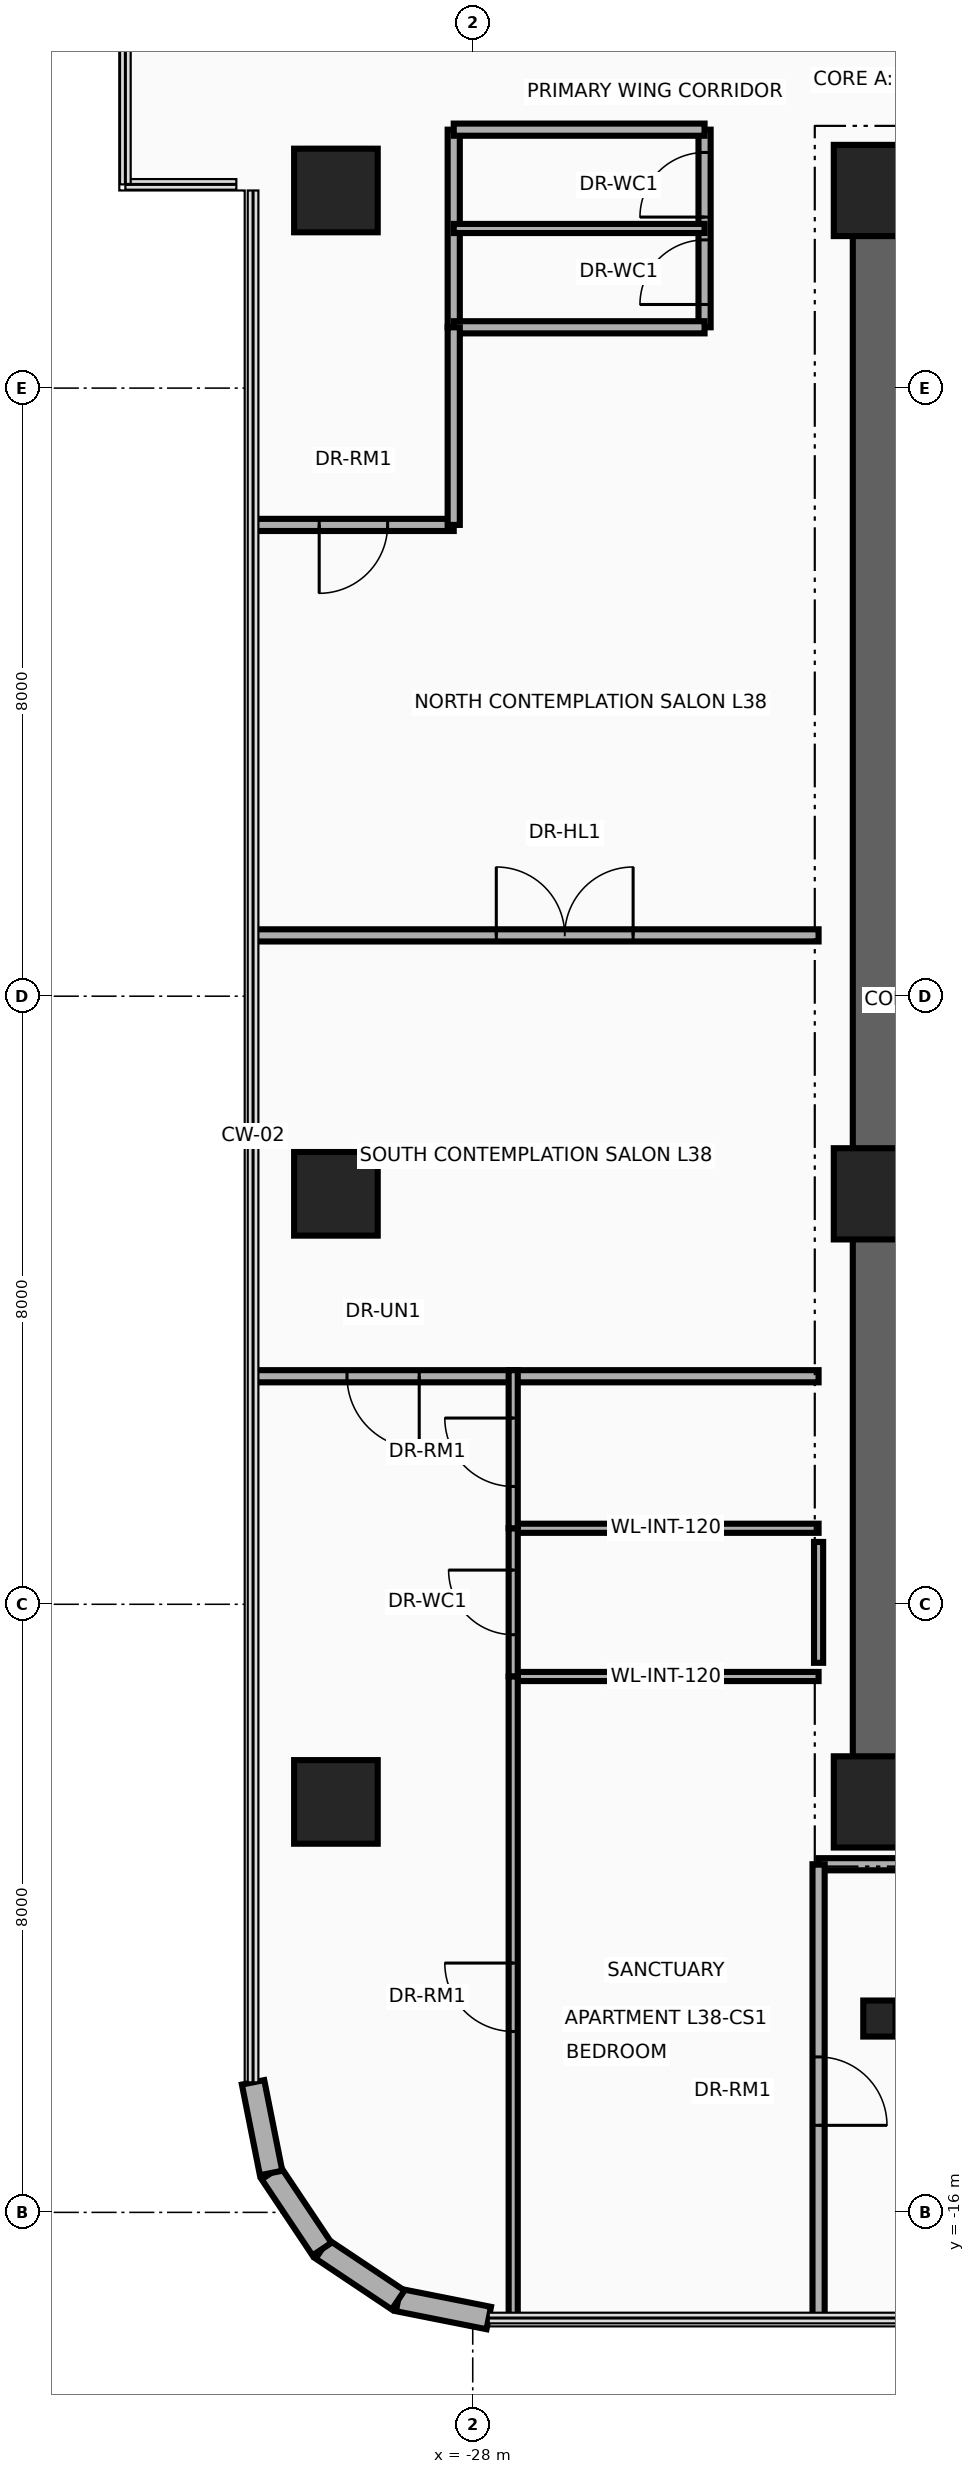
"""IFC4 building model, lengths in metres.
Left out: names, types, materials, properties, quantities, classifications, styles, units other than length and angle.
Written with IfcOpenShell. Run it as: python <this file> out.ifc"""

import sys

from ifc_helpers import new_model, si_unit, direction, frame, frame_2d, origin, origin_2d, place, context, subcontext, project, spatial, rectangle, circle, i_section, extrude, source, transform, mapped, element, fill, save


model = new_model("IFC4")
c1 = context("Model", 3, precision=1e-05, world=origin(), true_north=direction((0.0, 1.0)))
c2 = subcontext(c1, "Body", "Model", "MODEL_VIEW")
j1 = project(units=[si_unit("LENGTHUNIT", "METRE"), si_unit("PLANEANGLEUNIT", "RADIAN")], contexts=[c1])
p1 = place(None, origin())
s1 = spatial("IfcSite", under=j1, at=p1, CompositionType="ELEMENT")
p2 = place(p1, origin())
s2 = spatial("IfcBuilding", under=s1, at=p2, CompositionType="ELEMENT")
p3 = place(p2, frame((0.0, 0.0, 150.1)))
s3 = spatial("IfcBuildingStorey", under=s2, at=p3, CompositionType="ELEMENT", Elevation=150.1)
p4 = place(p3, frame((-22.65, -11.15, 0.0), z_axis=(0.0, 0.0, 1.0), x_axis=(0.0, 1.0, 0.0)))
e1 = element("IfcWall", 1, at=p4, inside=s3, PredefinedType="SHEAR", context=c2, shape_type="SweptSolid", body=[
    extrude(rectangle(XDim=22.3, YDim=0.7, at=frame_2d((11.15, 0.0))), origin(), (0.0, 0.0, 1.0), 3.46),
])
for number, where, z_axis, x_axis in (
    (2, (-22.65, 10.8, 0.0), (0.0, 0.0, 1.0), (1.0, 0.0, 0.0)),
    (3, (-22.65, -10.8, 0.0), (0.0, 0.0, 1.0), (1.0, 0.0, 0.0)),
):
    element("IfcWall", number, at=place(p3, frame(where, z_axis=z_axis, x_axis=x_axis)), inside=s3, PredefinedType="SHEAR", context=c2, shape_type="SweptSolid", body=[
        extrude(rectangle(XDim=10.25, YDim=0.7, at=frame_2d((5.125, 0.0))), origin(), (0.0, 0.0, 1.0), 3.46),
    ])
m1 = source(origin(), c2, "Body", "SweptSolid", [
    extrude(circle(Radius=0.55, at=origin_2d()), origin(), (0.0, 0.0, 1.0), 3.7),
])
p5 = place(p3, frame((-29.8, -10.6, 0.0), z_axis=(0.0, 0.0, 1.0), x_axis=(1.0, 0.0, 0.0)))
e4 = element("IfcColumn", 4, at=p5, inside=s3, PredefinedType="COLUMN", context=c2, shape_type="MappedRepresentation", body=[
    mapped(m1, transform((0.0, 0.0, 0.0), x_axis=(1.0, 0.0, 0.0), y_axis=(0.0, 1.0, 0.0), z_axis=(0.0, 0.0, 1.0), scale=1.0)),
])
m2 = source(origin(), c2, "Body", "SweptSolid", [
    extrude(rectangle(XDim=1.2, YDim=1.2, at=origin_2d()), origin(), (0.0, 0.0, 1.0), 3.7),
])
p6 = place(p3, frame((-22.65, -10.6, 0.0), z_axis=(0.0, 0.0, 1.0), x_axis=(1.0, 0.0, 0.0)))
e5 = element("IfcColumn", 5, at=p6, inside=s3, PredefinedType="COLUMN", context=c2, shape_type="MappedRepresentation", body=[
    mapped(m2, transform((0.0, 0.0, 0.0), x_axis=(1.0, 0.0, 0.0), y_axis=(0.0, 1.0, 0.0), z_axis=(0.0, 0.0, 1.0), scale=1.0)),
])
p7 = place(p3, frame((-29.8, -2.6, 0.0), z_axis=(0.0, 0.0, 1.0), x_axis=(1.0, 0.0, 0.0)))
e6 = element("IfcColumn", 6, at=p7, inside=s3, PredefinedType="COLUMN", context=c2, shape_type="MappedRepresentation", body=[
    mapped(m1, transform((0.0, 0.0, 0.0), x_axis=(1.0, 0.0, 0.0), y_axis=(0.0, 1.0, 0.0), z_axis=(0.0, 0.0, 1.0), scale=1.0)),
])
p8 = place(p3, frame((-22.65, -2.6, 0.0), z_axis=(0.0, 0.0, 1.0), x_axis=(1.0, 0.0, 0.0)))
e7 = element("IfcColumn", 7, at=p8, inside=s3, PredefinedType="COLUMN", context=c2, shape_type="MappedRepresentation", body=[
    mapped(m2, transform((0.0, 0.0, 0.0), x_axis=(1.0, 0.0, 0.0), y_axis=(0.0, 1.0, 0.0), z_axis=(0.0, 0.0, 1.0), scale=1.0)),
])
p9 = place(p3, frame((-29.8, 10.6, 0.0), z_axis=(0.0, 0.0, 1.0), x_axis=(1.0, 0.0, 0.0)))
e8 = element("IfcColumn", 8, at=p9, inside=s3, PredefinedType="COLUMN", context=c2, shape_type="MappedRepresentation", body=[
    mapped(m1, transform((0.0, 0.0, 0.0), x_axis=(1.0, 0.0, 0.0), y_axis=(0.0, 1.0, 0.0), z_axis=(0.0, 0.0, 1.0), scale=1.0)),
])
p10 = place(p3, frame((-22.65, 10.6, 0.0), z_axis=(0.0, 0.0, 1.0), x_axis=(1.0, 0.0, 0.0)))
e9 = element("IfcColumn", 9, at=p10, inside=s3, PredefinedType="COLUMN", context=c2, shape_type="MappedRepresentation", body=[
    mapped(m2, transform((0.0, 0.0, 0.0), x_axis=(1.0, 0.0, 0.0), y_axis=(0.0, 1.0, 0.0), z_axis=(0.0, 0.0, 1.0), scale=1.0)),
])
m3 = source(origin(), c2, "Body", "SweptSolid", [
    extrude(i_section(OverallWidth=0.424, OverallDepth=0.474, WebThickness=0.048, FlangeThickness=0.077, at=origin_2d()), origin(), (0.0, 0.0, 1.0), 3.7),
])
p11 = place(p3, frame((-22.65, -13.45, 0.0), z_axis=(0.0, 0.0, 1.0), x_axis=(1.0, 0.0, 0.0)))
e10 = element("IfcColumn", 10, at=p11, inside=s3, PredefinedType="COLUMN", context=c2, shape_type="MappedRepresentation", body=[
    mapped(m3, transform((0.0, 0.0, 0.0), x_axis=(1.0, 0.0, 0.0), y_axis=(0.0, 1.0, 0.0), z_axis=(0.0, 0.0, 1.0), scale=1.0)),
])
p12 = place(p3, frame((-27.789, -17.39, 0.0), z_axis=(0.0, 0.0, 1.0), x_axis=(-0.980804027463, 0.194996050505, 0.0)))
e11 = element("IfcWall", 11, at=p12, inside=s3, PredefinedType="SOLIDWALL", context=c2, shape_type="SweptSolid", body=[
    extrude(rectangle(XDim=1.216, YDim=0.3, at=frame_2d((0.608, 0.0))), origin(), (0.0, 0.0, 1.0), 3.46),
])
for number, where, z_axis, x_axis in (
    (12, (-28.982, -17.153, 0.0), (0.0, 0.0, 1.0), (-0.831, 0.556, 0.0)),
    (13, (-29.983, -16.483, 0.0), (0.0, 0.0, 1.0), (-0.556, 0.831, 0.0)),
):
    element("IfcWall", number, at=place(p3, frame(where, z_axis=z_axis, x_axis=x_axis)), inside=s3, PredefinedType="SOLIDWALL", context=c2, shape_type="SweptSolid", body=[
        extrude(rectangle(XDim=1.205, YDim=0.3, at=frame_2d((0.603, 0.0))), origin(), (0.0, 0.0, 1.0), 3.46),
    ])
p13 = place(p3, frame((-30.653, -15.482, 0.0), z_axis=(0.0, 0.0, 1.0), x_axis=(-0.194996050505, 0.980804027463, 0.0)))
e14 = element("IfcWall", 14, at=p13, inside=s3, PredefinedType="SOLIDWALL", context=c2, shape_type="SweptSolid", body=[
    extrude(rectangle(XDim=1.216, YDim=0.3, at=frame_2d((0.608, 0.0))), origin(), (0.0, 0.0, 1.0), 3.46),
])
p14 = place(p3, frame((-28.25, 8.8, 0.0), z_axis=(0.0, 0.0, 1.0), x_axis=(0.0, 1.0, 0.0)))
e15 = element("IfcWall", 15, at=p14, inside=s3, PredefinedType="PARTITIONING", context=c2, shape_type="SweptSolid", body=[
    extrude(rectangle(XDim=2.6, YDim=0.16, at=frame_2d((1.3, 0.0))), origin(), (0.0, 0.0, 1.0), 2.666),
])
p15 = place(p3, frame((-24.95, 8.8, 0.0), z_axis=(0.0, 0.0, 1.0), x_axis=(0.0, 1.0, 0.0)))
e16 = element("IfcWall", 16, at=p15, inside=s3, PredefinedType="PARTITIONING", context=c2, shape_type="SweptSolid", body=[
    extrude(rectangle(XDim=2.6, YDim=0.16, at=frame_2d((1.3, 0.0))), origin(), (0.0, 0.0, 1.0), 2.666),
])
p16 = place(p15, frame((0.3, 0.0, 0.0)))
e17 = element("IfcOpeningElement", 17, at=p16, cuts=e16, PredefinedType="OPENING", context=c2, shape_type="SweptSolid", body=[
    extrude(rectangle(XDim=0.85, YDim=2.1, at=frame_2d((0.425, 1.05))), frame((0.0, 0.095, 0.0), z_axis=(0.0, -1.0, 0.0), x_axis=(1.0, 0.0, 0.0)), (0.0, 0.0, 1.0), 0.19),
])
p17 = place(p15, frame((1.45, 0.0, 0.0)))
e18 = element("IfcOpeningElement", 18, at=p17, cuts=e16, PredefinedType="OPENING", context=c2, shape_type="SweptSolid", body=[
    extrude(rectangle(XDim=0.85, YDim=2.1, at=frame_2d((0.425, 1.05))), frame((0.0, 0.095, 0.0), z_axis=(0.0, -1.0, 0.0), x_axis=(1.0, 0.0, 0.0)), (0.0, 0.0, 1.0), 0.19),
])
for number, where, z_axis, x_axis in (
    (19, (-28.25, 8.8, 0.0), (0.0, 0.0, 1.0), (1.0, 0.0, 0.0)),
    (20, (-28.25, 11.4, 0.0), (0.0, 0.0, 1.0), (1.0, 0.0, 0.0)),
):
    element("IfcWall", number, at=place(p3, frame(where, z_axis=z_axis, x_axis=x_axis)), inside=s3, PredefinedType="PARTITIONING", context=c2, shape_type="SweptSolid", body=[
        extrude(rectangle(XDim=3.3, YDim=0.16, at=frame_2d((1.65, 0.0))), origin(), (0.0, 0.0, 1.0), 3.46),
    ])
p18 = place(p3, frame((-28.25, 10.1, 0.0), z_axis=(0.0, 0.0, 1.0), x_axis=(1.0, 0.0, 0.0)))
e21 = element("IfcWall", 21, at=p18, inside=s3, PredefinedType="PARTITIONING", context=c2, shape_type="SweptSolid", body=[
    extrude(rectangle(XDim=3.3, YDim=0.12, at=frame_2d((1.65, 0.0))), origin(), (0.0, 0.0, 1.0), 3.46),
])
p19 = place(p3, frame((-23.45, -11.42, 0.0), z_axis=(0.0, 0.0, 1.0), x_axis=(1.0, 0.0, 0.0)))
e22 = element("IfcWall", 22, at=p19, inside=s3, PredefinedType="PARTITIONING", context=c2, shape_type="SweptSolid", body=[
    extrude(rectangle(XDim=13.84, YDim=0.16, at=frame_2d((6.92, 0.0))), origin(), (0.0, 0.0, 1.0), 2.834),
])
p20 = place(p3, frame((-23.45, -17.39, 0.0), z_axis=(0.0, 0.0, 1.0), x_axis=(0.0, 1.0, 0.0)))
e23 = element("IfcWall", 23, at=p20, inside=s3, PredefinedType="PARTITIONING", context=c2, shape_type="SweptSolid", body=[
    extrude(rectangle(XDim=5.97, YDim=0.16, at=frame_2d((2.985, 0.0))), origin(), (0.0, 0.0, 1.0), 3.46),
])
p21 = place(p20, frame((2.535, 0.0, 0.0)))
e24 = element("IfcOpeningElement", 24, at=p21, cuts=e23, PredefinedType="OPENING", context=c2, shape_type="SweptSolid", body=[
    extrude(rectangle(XDim=0.9, YDim=2.1, at=frame_2d((0.45, 1.05))), frame((0.0, 0.095, 0.0), z_axis=(0.0, -1.0, 0.0), x_axis=(1.0, 0.0, 0.0)), (0.0, 0.0, 1.0), 0.19),
])
p22 = place(p3, frame((-30.89, -5.0, 0.0), z_axis=(0.0, 0.0, 1.0), x_axis=(1.0, 0.0, 0.0)))
e25 = element("IfcWall", 25, at=p22, inside=s3, PredefinedType="PARTITIONING", context=c2, shape_type="SweptSolid", body=[
    extrude(rectangle(XDim=7.44, YDim=0.16, at=frame_2d((3.72, 0.0))), origin(), (0.0, 0.0, 1.0), 2.896),
])
p23 = place(p22, frame((1.236, 0.0, 0.0)))
e26 = element("IfcOpeningElement", 26, at=p23, cuts=e25, PredefinedType="OPENING", context=c2, shape_type="SweptSolid", body=[
    extrude(rectangle(XDim=0.95, YDim=2.15, at=frame_2d((0.475, 1.075))), frame((0.0, 0.095, 0.0), z_axis=(0.0, -1.0, 0.0), x_axis=(1.0, 0.0, 0.0)), (0.0, 0.0, 1.0), 0.19),
])
p24 = place(p3, frame((-30.89, 6.2, 0.0), z_axis=(0.0, 0.0, 1.0), x_axis=(1.0, 0.0, 0.0)))
e27 = element("IfcWall", 27, at=p24, inside=s3, PredefinedType="PARTITIONING", context=c2, shape_type="SweptSolid", body=[
    extrude(rectangle(XDim=2.64, YDim=0.16, at=frame_2d((1.32, 0.0))), origin(), (0.0, 0.0, 1.0), 2.896),
])
p25 = place(p24, frame((0.87, 0.0, 0.0)))
e28 = element("IfcOpeningElement", 28, at=p25, cuts=e27, PredefinedType="OPENING", context=c2, shape_type="SweptSolid", body=[
    extrude(rectangle(XDim=0.9, YDim=2.1, at=frame_2d((0.45, 1.05))), frame((0.0, 0.095, 0.0), z_axis=(0.0, -1.0, 0.0), x_axis=(1.0, 0.0, 0.0)), (0.0, 0.0, 1.0), 0.19),
])
p26 = place(p3, frame((-28.25, 6.2, 0.0), z_axis=(0.0, 0.0, 1.0), x_axis=(0.0, 1.0, 0.0)))
e29 = element("IfcWall", 29, at=p26, inside=s3, PredefinedType="PARTITIONING", context=c2, shape_type="SweptSolid", body=[
    extrude(rectangle(XDim=2.6, YDim=0.16, at=frame_2d((1.3, 0.0))), origin(), (0.0, 0.0, 1.0), 2.988),
])
p27 = place(p3, frame((-27.468, -7.0, 0.0), z_axis=(0.0, 0.0, 1.0), x_axis=(1.0, 0.0, 0.0)))
e30 = element("IfcWall", 30, at=p27, inside=s3, PredefinedType="PARTITIONING", context=c2, shape_type="SweptSolid", body=[
    extrude(rectangle(XDim=4.018, YDim=0.12, at=frame_2d((2.009, 0.0))), origin(), (0.0, 0.0, 1.0), 3.46),
])
p28 = place(p3, frame((-27.468, -8.95, 0.0), z_axis=(0.0, 0.0, 1.0), x_axis=(1.0, 0.0, 0.0)))
e31 = element("IfcWall", 31, at=p28, inside=s3, PredefinedType="PARTITIONING", context=c2, shape_type="SweptSolid", body=[
    extrude(rectangle(XDim=4.018, YDim=0.12, at=frame_2d((2.009, 0.0))), origin(), (0.0, 0.0, 1.0), 2.988),
])
p29 = place(p3, frame((-27.468, -8.95, 0.0), z_axis=(0.0, 0.0, 1.0), x_axis=(0.0, 1.0, 0.0)))
e32 = element("IfcWall", 32, at=p29, inside=s3, PredefinedType="PARTITIONING", context=c2, shape_type="SweptSolid", body=[
    extrude(rectangle(XDim=1.95, YDim=0.12, at=frame_2d((0.975, 0.0))), origin(), (0.0, 0.0, 1.0), 2.988),
])
p30 = place(p29, frame((0.55, 0.0, 0.0)))
e33 = element("IfcOpeningElement", 33, at=p30, cuts=e32, PredefinedType="OPENING", context=c2, shape_type="SweptSolid", body=[
    extrude(rectangle(XDim=0.85, YDim=2.1, at=frame_2d((0.425, 1.05))), frame((0.0, 0.075, 0.0), z_axis=(0.0, -1.0, 0.0), x_axis=(1.0, 0.0, 0.0)), (0.0, 0.0, 1.0), 0.15),
])
p31 = place(p3, frame((-27.468, -7.0, 0.0), z_axis=(0.0, 0.0, 1.0), x_axis=(0.0, 1.0, 0.0)))
e34 = element("IfcWall", 34, at=p31, inside=s3, PredefinedType="PARTITIONING", context=c2, shape_type="SweptSolid", body=[
    extrude(rectangle(XDim=2.08, YDim=0.12, at=frame_2d((1.04, 0.0))), origin(), (0.0, 0.0, 1.0), 2.988),
])
p32 = place(p31, frame((0.55, 0.0, 0.0)))
e35 = element("IfcOpeningElement", 35, at=p32, cuts=e34, PredefinedType="OPENING", context=c2, shape_type="SweptSolid", body=[
    extrude(rectangle(XDim=0.9, YDim=2.1, at=frame_2d((0.45, 1.05))), frame((0.0, 0.075, 0.0), z_axis=(0.0, -1.0, 0.0), x_axis=(1.0, 0.0, 0.0)), (0.0, 0.0, 1.0), 0.15),
])
p33 = place(p3, frame((-27.468, -17.39, 0.0), z_axis=(0.0, 0.0, 1.0), x_axis=(0.0, 1.0, 0.0)))
e36 = element("IfcWall", 36, at=p33, inside=s3, PredefinedType="PARTITIONING", context=c2, shape_type="SweptSolid", body=[
    extrude(rectangle(XDim=8.44, YDim=0.12, at=frame_2d((4.22, 0.0))), origin(), (0.0, 0.0, 1.0), 2.666),
])
p34 = place(p33, frame((3.77, 0.0, 0.0)))
e37 = element("IfcOpeningElement", 37, at=p34, cuts=e36, PredefinedType="OPENING", context=c2, shape_type="SweptSolid", body=[
    extrude(rectangle(XDim=0.9, YDim=2.1, at=frame_2d((0.45, 1.05))), frame((0.0, 0.075, 0.0), z_axis=(0.0, -1.0, 0.0), x_axis=(1.0, 0.0, 0.0)), (0.0, 0.0, 1.0), 0.15),
])
p35 = place(p3, frame((-23.45, -8.77, 0.0), z_axis=(0.0, 0.0, 1.0), x_axis=(0.0, 1.0, 0.0)))
e38 = element("IfcWall", 38, at=p35, inside=s3, PredefinedType="PARTITIONING", context=c2, shape_type="SweptSolid", body=[
    extrude(rectangle(XDim=1.59, YDim=0.12, at=frame_2d((0.795, 0.0))), origin(), (0.0, 0.0, 1.0), 2.988),
])
p36 = place(p3, frame((-30.89, 0.8, 0.0), z_axis=(0.0, 0.0, 1.0), x_axis=(1.0, 0.0, 0.0)))
e39 = element("IfcWall", 39, at=p36, inside=s3, PredefinedType="PARTITIONING", context=c2, shape_type="SweptSolid", body=[
    extrude(rectangle(XDim=7.44, YDim=0.16, at=frame_2d((3.72, 0.0))), origin(), (0.0, 0.0, 1.0), 2.896),
])
p37 = place(p36, frame((3.2, 0.0, 0.0)))
e40 = element("IfcOpeningElement", 40, at=p37, cuts=e39, PredefinedType="OPENING", context=c2, shape_type="SweptSolid", body=[
    extrude(rectangle(XDim=1.8, YDim=2.15, at=frame_2d((0.9, 1.075))), frame((0.0, 0.095, 0.0), z_axis=(0.0, -1.0, 0.0), x_axis=(1.0, 0.0, 0.0)), (0.0, 0.0, 1.0), 0.19),
])
p38 = place(p16, origin())
e41 = element("IfcDoor", 41, at=p38, inside=s3, OperationType="SINGLE_SWING_LEFT", PredefinedType="DOOR", context=c2, shape_type="SweptSolid", body=[
    extrude(rectangle(XDim=0.85, YDim=2.1, at=frame_2d((0.425, 1.05))), frame((0.0, 0.025, 0.0), z_axis=(0.0, -1.0, 0.0), x_axis=(1.0, 0.0, 0.0)), (0.0, 0.0, 1.0), 0.05),
])
fill(e17, e41)
p39 = place(p17, origin())
e42 = element("IfcDoor", 42, at=p39, inside=s3, OperationType="SINGLE_SWING_RIGHT", PredefinedType="DOOR", context=c2, shape_type="SweptSolid", body=[
    extrude(rectangle(XDim=0.85, YDim=2.1, at=frame_2d((0.425, 1.05))), frame((0.0, 0.025, 0.0), z_axis=(0.0, -1.0, 0.0), x_axis=(1.0, 0.0, 0.0)), (0.0, 0.0, 1.0), 0.05),
])
fill(e18, e42)
p40 = place(p23, frame((0.95, 0.0, 0.0), z_axis=(0.0, 0.0, 1.0), x_axis=(-1.0, 0.0, 0.0)))
e43 = element("IfcDoor", 43, at=p40, inside=s3, OperationType="SINGLE_SWING_LEFT", PredefinedType="DOOR", context=c2, shape_type="SweptSolid", body=[
    extrude(rectangle(XDim=0.95, YDim=2.15, at=frame_2d((0.475, 1.075))), frame((0.0, 0.025, 0.0), z_axis=(0.0, -1.0, 0.0), x_axis=(1.0, 0.0, 0.0)), (0.0, 0.0, 1.0), 0.05),
])
fill(e26, e43)
p41 = place(p30, origin())
e44 = element("IfcDoor", 44, at=p41, inside=s3, OperationType="SINGLE_SWING_RIGHT", PredefinedType="DOOR", context=c2, shape_type="SweptSolid", body=[
    extrude(rectangle(XDim=0.85, YDim=2.1, at=frame_2d((0.425, 1.05))), frame((0.0, 0.025, 0.0), z_axis=(0.0, -1.0, 0.0), x_axis=(1.0, 0.0, 0.0)), (0.0, 0.0, 1.0), 0.05),
])
fill(e33, e44)
p42 = place(p32, origin())
e45 = element("IfcDoor", 45, at=p42, inside=s3, OperationType="SINGLE_SWING_LEFT", PredefinedType="DOOR", context=c2, shape_type="SweptSolid", body=[
    extrude(rectangle(XDim=0.9, YDim=2.1, at=frame_2d((0.45, 1.05))), frame((0.0, 0.025, 0.0), z_axis=(0.0, -1.0, 0.0), x_axis=(1.0, 0.0, 0.0)), (0.0, 0.0, 1.0), 0.05),
])
fill(e35, e45)
p43 = place(p34, origin())
e46 = element("IfcDoor", 46, at=p43, inside=s3, OperationType="SINGLE_SWING_RIGHT", PredefinedType="DOOR", context=c2, shape_type="SweptSolid", body=[
    extrude(rectangle(XDim=0.9, YDim=2.1, at=frame_2d((0.45, 1.05))), frame((0.0, 0.025, 0.0), z_axis=(0.0, -1.0, 0.0), x_axis=(1.0, 0.0, 0.0)), (0.0, 0.0, 1.0), 0.05),
])
fill(e37, e46)
p44 = place(p25, frame((0.9, 0.0, 0.0), z_axis=(0.0, 0.0, 1.0), x_axis=(-1.0, 0.0, 0.0)))
e47 = element("IfcDoor", 47, at=p44, inside=s3, OperationType="SINGLE_SWING_LEFT", PredefinedType="DOOR", context=c2, shape_type="SweptSolid", body=[
    extrude(rectangle(XDim=0.9, YDim=2.1, at=frame_2d((0.45, 1.05))), frame((0.0, 0.025, 0.0), z_axis=(0.0, -1.0, 0.0), x_axis=(1.0, 0.0, 0.0)), (0.0, 0.0, 1.0), 0.05),
])
fill(e28, e47)
p45 = place(p37, origin())
e48 = element("IfcDoor", 48, at=p45, inside=s3, OperationType="DOUBLE_DOOR_SINGLE_SWING", PredefinedType="DOOR", context=c2, shape_type="SweptSolid", body=[
    extrude(rectangle(XDim=1.8, YDim=2.15, at=frame_2d((0.9, 1.075))), frame((0.0, 0.025, 0.0), z_axis=(0.0, -1.0, 0.0), x_axis=(1.0, 0.0, 0.0)), (0.0, 0.0, 1.0), 0.05),
])
fill(e40, e48)
p46 = place(p21, frame((0.9, 0.0, 0.0), z_axis=(0.0, 0.0, 1.0), x_axis=(-1.0, 0.0, 0.0)))
e49 = element("IfcDoor", 49, at=p46, inside=s3, OperationType="SINGLE_SWING_LEFT", PredefinedType="DOOR", context=c2, shape_type="SweptSolid", body=[
    extrude(rectangle(XDim=0.9, YDim=2.1, at=frame_2d((0.45, 1.05))), frame((0.0, 0.025, 0.0), z_axis=(0.0, -1.0, 0.0), x_axis=(1.0, 0.0, 0.0)), (0.0, 0.0, 1.0), 0.05),
])
fill(e24, e49)
save(model, sys.argv[1])
